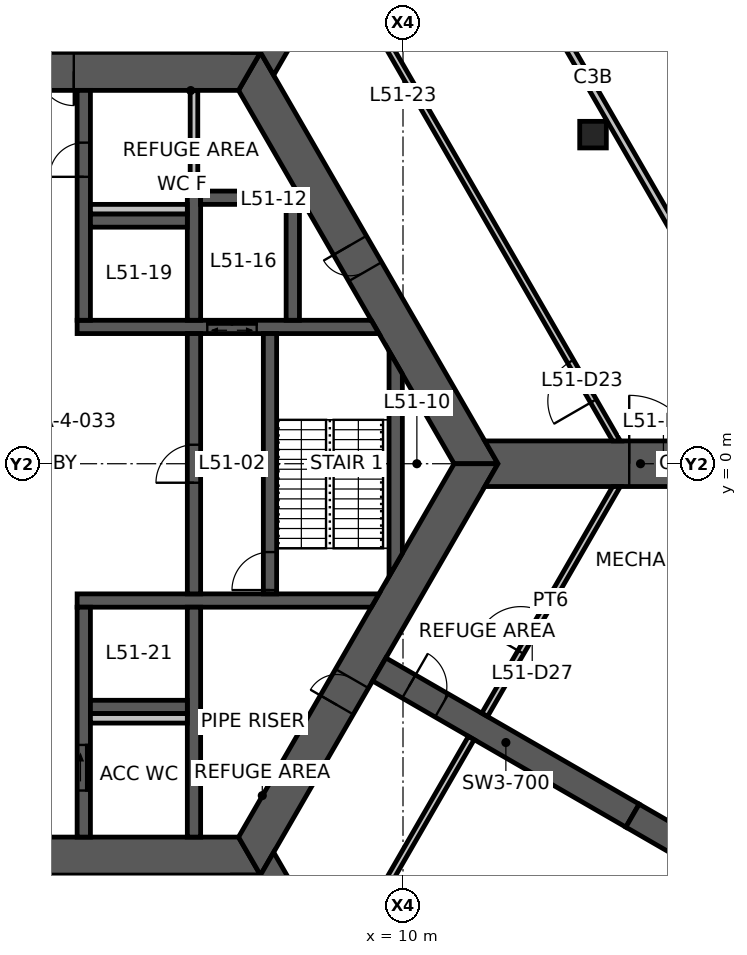
"""IFC4 building model, lengths in metres.
Left out: names, types, materials, properties, quantities, classifications, styles, units other than length and angle.
Written with IfcOpenShell. Run it as: python <this file> out.ifc"""

import sys

from ifc_helpers import new_model, si_unit, direction, frame, frame_2d, origin, origin_2d, place, context, subcontext, project, spatial, polyline, rectangle, hollow_rectangle, outline, extrude, element, fill, save


model = new_model("IFC4")
c1 = context("Model", 3, precision=1e-05, world=origin(), true_north=direction((0.0, 1.0)))
c2 = subcontext(c1, "Body", "Model", "MODEL_VIEW")
j1 = project(units=[si_unit("LENGTHUNIT", "METRE"), si_unit("PLANEANGLEUNIT", "RADIAN")], contexts=[c1])
p1 = place(None, origin())
s1 = spatial("IfcSite", under=j1, at=p1, CompositionType="ELEMENT")
p2 = place(p1, origin())
s2 = spatial("IfcBuilding", under=s1, at=p2, CompositionType="ELEMENT")
p3 = place(p2, frame((0.0, 0.0, 203.3)))
s3 = spatial("IfcBuildingStorey", under=s2, at=p3, CompositionType="ELEMENT", Elevation=203.3)
p4 = place(p3, frame((15.0, 8.66, 0.0), z_axis=(0.0, 0.0, 1.0), x_axis=(1.0, 0.0, 0.0)))
e1 = element("IfcColumn", 1, at=p4, inside=s3, PredefinedType="COLUMN", context=c2, shape_type="SweptSolid", body=[
    extrude(hollow_rectangle(XDim=0.7, YDim=0.7, WallThickness=0.036, at=origin_2d()), origin(), (0.0, 0.0, 1.0), 5.0),
])
p5 = place(p3, frame((11.922, 0.0, 0.0), z_axis=(0.0, 0.0, 1.0), x_axis=(-0.500004296715, 0.866022923061, 0.0)))
e2 = element("IfcWall", 2, at=p5, inside=s3, PredefinedType="SHEAR", context=c2, shape_type="SweptSolid", body=[
    extrude(outline(polyline([(-0.289, -0.5), (5.835, -0.5), (6.635, -0.5), (12.211, -0.5), (11.634, 0.5), (6.635, 0.5), (5.835, 0.5), (0.289, 0.5), (-0.289, -0.5)])), origin(), (0.0, 0.0, 1.0), 5.0),
])
p6 = place(p5, frame((5.835, 0.0, 0.0)))
e3 = element("IfcOpeningElement", 3, at=p6, cuts=e2, PredefinedType="OPENING", context=c2, shape_type="SweptSolid", body=[
    extrude(rectangle(XDim=0.8, YDim=2.1, at=frame_2d((0.4, 1.05))), frame((0.0, 0.51, 0.0), z_axis=(0.0, -1.0, 0.0), x_axis=(1.0, 0.0, 0.0)), (0.0, 0.0, 1.0), 1.02),
])
p7 = place(p3, frame((5.961, 10.325, 0.0), z_axis=(0.0, 0.0, 1.0), x_axis=(-1.0, 0.0, 0.0)))
e4 = element("IfcWall", 4, at=p7, inside=s3, PredefinedType="SHEAR", context=c2, shape_type="SweptSolid", body=[
    extrude(outline(polyline([(-0.289, -0.5), (4.624, -0.5), (5.523, -0.5), (6.399, -0.5), (7.299, -0.5), (12.211, -0.5), (11.634, 0.5), (7.299, 0.5), (6.399, 0.5), (5.523, 0.5), (4.624, 0.5), (0.289, 0.5), (-0.289, -0.5)])), origin(), (0.0, 0.0, 1.0), 5.0),
])
p8 = place(p7, frame((6.399, 0.0, 0.0)))
e5 = element("IfcOpeningElement", 5, at=p8, cuts=e4, PredefinedType="OPENING", context=c2, shape_type="SweptSolid", body=[
    extrude(rectangle(XDim=0.9, YDim=2.1, at=frame_2d((0.45, 1.05))), frame((0.0, 0.51, 0.0), z_axis=(0.0, -1.0, 0.0), x_axis=(1.0, 0.0, 0.0)), (0.0, 0.0, 1.0), 1.02),
])
p9 = place(p7, frame((4.624, 0.0, 0.0)))
e6 = element("IfcOpeningElement", 6, at=p9, cuts=e4, PredefinedType="OPENING", context=c2, shape_type="SweptSolid", body=[
    extrude(rectangle(XDim=0.9, YDim=2.1, at=frame_2d((0.45, 1.05))), frame((0.0, 0.51, 0.0), z_axis=(0.0, -1.0, 0.0), x_axis=(1.0, 0.0, 0.0)), (0.0, 0.0, 1.0), 1.02),
])
p10 = place(p3, frame((-5.961, -10.325, 0.0), z_axis=(0.0, 0.0, 1.0), x_axis=(1.0, 0.0, 0.0)))
e7 = element("IfcWall", 7, at=p10, inside=s3, PredefinedType="SHEAR", context=c2, shape_type="SweptSolid", body=[
    extrude(outline(polyline([(-0.289, -0.5), (5.461, -0.5), (6.461, -0.5), (12.211, -0.5), (11.634, 0.5), (6.461, 0.5), (5.461, 0.5), (0.289, 0.5), (-0.289, -0.5)])), origin(), (0.0, 0.0, 1.0), 5.0),
])
p11 = place(p10, frame((5.461, 0.0, 0.0)))
e8 = element("IfcOpeningElement", 8, at=p11, cuts=e7, PredefinedType="OPENING", context=c2, shape_type="SweptSolid", body=[
    extrude(rectangle(XDim=1.0, YDim=2.1, at=frame_2d((0.5, 1.05))), frame((0.0, 0.51, 0.0), z_axis=(0.0, -1.0, 0.0), x_axis=(1.0, 0.0, 0.0)), (0.0, 0.0, 1.0), 1.02),
])
p12 = place(p3, frame((5.961, -10.325, 0.0), z_axis=(0.0, 0.0, 1.0), x_axis=(0.500004296715, 0.866022923061, 0.0)))
e9 = element("IfcWall", 9, at=p12, inside=s3, PredefinedType="SHEAR", context=c2, shape_type="SweptSolid", body=[
    extrude(outline(polyline([(-0.289, -0.5), (4.594, -0.5), (5.394, -0.5), (12.211, -0.5), (11.634, 0.5), (5.394, 0.5), (4.594, 0.5), (0.289, 0.5), (-0.289, -0.5)])), origin(), (0.0, 0.0, 1.0), 5.0),
])
p13 = place(p12, frame((4.594, 0.0, 0.0)))
e10 = element("IfcOpeningElement", 10, at=p13, cuts=e9, PredefinedType="OPENING", context=c2, shape_type="SweptSolid", body=[
    extrude(rectangle(XDim=0.8, YDim=2.1, at=frame_2d((0.4, 1.05))), frame((0.0, 0.51, 0.0), z_axis=(0.0, -1.0, 0.0), x_axis=(1.0, 0.0, 0.0)), (0.0, 0.0, 1.0), 1.02),
])
p14 = place(p3, frame((9.375, -5.413, 0.0), z_axis=(0.0, 0.0, 1.0), x_axis=(0.866032377459, -0.499987921047, 0.0)))
e11 = element("IfcWall", 11, at=p14, inside=s3, PredefinedType="SHEAR", context=c2, shape_type="SweptSolid", body=[
    extrude(rectangle(XDim=7.696, YDim=0.7, at=frame_2d((3.848, 0.0))), origin(), (0.0, 0.0, 1.0), 5.0),
])
p15 = place(p14, frame((0.9, 0.0, 0.0)))
e12 = element("IfcOpeningElement", 12, at=p15, cuts=e11, PredefinedType="OPENING", context=c2, shape_type="SweptSolid", body=[
    extrude(rectangle(XDim=1.0, YDim=2.1, at=frame_2d((0.5, 1.05))), frame((0.0, 0.36, 0.0), z_axis=(0.0, -1.0, 0.0), x_axis=(1.0, 0.0, 0.0)), (0.0, 0.0, 1.0), 0.72),
])
p16 = place(p3, frame((16.039, -9.26, 0.0), z_axis=(0.0, 0.0, 1.0), x_axis=(0.866024837091, -0.50000098154, 0.0)))
e13 = element("IfcWall", 13, at=p16, inside=s3, PredefinedType="SHEAR", context=c2, shape_type="SweptSolid", body=[
    extrude(rectangle(XDim=13.0, YDim=0.7, at=frame_2d((6.5, 0.0))), origin(), (0.0, 0.0, 1.0), 5.0),
])
p17 = place(p3, frame((12.5, 0.0, -1.15), z_axis=(0.0, 0.0, 1.0), x_axis=(1.0, 0.0, 0.0)))
e14 = element("IfcWall", 14, at=p17, inside=s3, PredefinedType="SHEAR", context=c2, shape_type="SweptSolid", body=[
    extrude(outline(polyline([(-0.346, -0.6), (3.453, -0.6), (5.253, -0.6), (7.5, -0.6), (7.5, 0.6), (5.253, 0.6), (3.453, 0.6), (-0.346, 0.6), (0.0, 0.0), (-0.346, -0.6)])), origin(), (0.0, 0.0, 1.0), 6.15),
])
p18 = place(p17, frame((3.453, 0.0, 1.15)))
e15 = element("IfcOpeningElement", 15, at=p18, cuts=e14, PredefinedType="OPENING", context=c2, shape_type="SweptSolid", body=[
    extrude(rectangle(XDim=1.8, YDim=2.4, at=frame_2d((0.9, 1.2))), frame((0.0, 0.61, 0.0), z_axis=(0.0, -1.0, 0.0), x_axis=(1.0, 0.0, 0.0)), (0.0, 0.0, 1.0), 1.22),
])
for number, where, z_axis, x_axis in (
    (16, (6.25, 10.825, -1.15), (0.0, 0.0, 1.0), (0.5, 0.866, 0.0)),
    (17, (6.25, -10.825, -1.15), (0.0, 0.0, 1.0), (0.5, -0.866, 0.0)),
):
    element("IfcWall", number, at=place(p3, frame(where, z_axis=z_axis, x_axis=x_axis)), inside=s3, PredefinedType="SHEAR", context=c2, shape_type="SweptSolid", body=[
        extrude(outline(polyline([(-0.346, -0.6), (7.5, -0.6), (7.5, 0.6), (-0.346, 0.6), (0.0, 0.0), (-0.346, -0.6)])), origin(), (0.0, 0.0, 1.0), 6.15),
    ])
p19 = place(p3, frame((20.389, 0.526, 0.0), z_axis=(0.0, 0.0, 1.0), x_axis=(-0.499993861681, 0.866028947716, 0.0)))
e18 = element("IfcWall", 18, at=p19, inside=s3, PredefinedType="ELEMENTEDWALL", context=c2, shape_type="SweptSolid", body=[
    extrude(rectangle(XDim=19.986, YDim=0.2, at=frame_2d((9.993, 0.0))), origin(), (0.0, 0.0, 1.0), 5.0),
])
p20 = place(p3, frame((1.425, 3.6, 0.0), z_axis=(0.0, 0.0, 1.0), x_axis=(1.0, 0.0, 0.0)))
e19 = element("IfcWall", 19, at=p20, inside=s3, PredefinedType="SHEAR", context=c2, shape_type="SweptSolid", body=[
    extrude(outline(polyline([(0.0, -0.175), (3.425, -0.175), (4.725, -0.175), (7.942, -0.175), (7.74, 0.175), (4.725, 0.175), (3.425, 0.175), (0.0, 0.175), (0.0, -0.175)])), origin(), (0.0, 0.0, 1.0), 5.0),
])
p21 = place(p20, frame((3.425, 0.0, 0.0)))
e20 = element("IfcOpeningElement", 20, at=p21, cuts=e19, PredefinedType="OPENING", context=c2, shape_type="SweptSolid", body=[
    extrude(rectangle(XDim=1.3, YDim=2.1, at=frame_2d((0.65, 1.05))), frame((0.0, 0.185, 0.0), z_axis=(0.0, -1.0, 0.0), x_axis=(1.0, 0.0, 0.0)), (0.0, 0.0, 1.0), 0.37),
])
p22 = place(p3, frame((1.425, -3.6, 0.0), z_axis=(0.0, 0.0, 1.0), x_axis=(1.0, 0.0, 0.0)))
e21 = element("IfcWall", 21, at=p22, inside=s3, PredefinedType="SHEAR", context=c2, shape_type="SweptSolid", body=[
    extrude(outline(polyline([(0.0, -0.175), (7.74, -0.175), (7.942, 0.175), (0.0, 0.175), (0.0, -0.175)])), origin(), (0.0, 0.0, 1.0), 5.0),
])
p23 = place(p3, frame((1.6, 3.775, 0.0), z_axis=(0.0, 0.0, 1.0), x_axis=(0.0, 1.0, 0.0)))
e22 = element("IfcWall", 22, at=p23, inside=s3, PredefinedType="SHEAR", context=c2, shape_type="SweptSolid", body=[
    extrude(rectangle(XDim=6.05, YDim=0.35, at=frame_2d((3.025, 0.0))), origin(), (0.0, 0.0, 1.0), 5.0),
])
p24 = place(p23, frame((3.775, 0.0, 0.0)))
e23 = element("IfcOpeningElement", 23, at=p24, cuts=e22, PredefinedType="OPENING", context=c2, shape_type="SweptSolid", body=[
    extrude(rectangle(XDim=0.9, YDim=2.1, at=frame_2d((0.45, 1.05))), frame((0.0, 0.185, 0.0), z_axis=(0.0, -1.0, 0.0), x_axis=(1.0, 0.0, 0.0)), (0.0, 0.0, 1.0), 0.37),
])
p25 = place(p3, frame((1.6, -3.775, 0.0), z_axis=(0.0, 0.0, 1.0), x_axis=(0.0, -1.0, 0.0)))
e24 = element("IfcWall", 24, at=p25, inside=s3, PredefinedType="SHEAR", context=c2, shape_type="SweptSolid", body=[
    extrude(rectangle(XDim=6.05, YDim=0.35, at=frame_2d((3.025, 0.0))), origin(), (0.0, 0.0, 1.0), 5.0),
])
p26 = place(p25, frame((3.625, 0.0, 0.0)))
e25 = element("IfcOpeningElement", 25, at=p26, cuts=e24, PredefinedType="OPENING", context=c2, shape_type="SweptSolid", body=[
    extrude(rectangle(XDim=1.2, YDim=2.1, at=frame_2d((0.6, 1.05))), frame((0.0, 0.185, 0.0), z_axis=(0.0, -1.0, 0.0), x_axis=(1.0, 0.0, 0.0)), (0.0, 0.0, 1.0), 0.37),
])
p27 = place(p3, frame((4.5, -3.425, 0.0), z_axis=(0.0, 0.0, 1.0), x_axis=(0.0, 1.0, 0.0)))
e26 = element("IfcWall", 26, at=p27, inside=s3, PredefinedType="SHEAR", context=c2, shape_type="SweptSolid", body=[
    extrude(rectangle(XDim=6.85, YDim=0.35, at=frame_2d((3.425, 0.0))), origin(), (0.0, 0.0, 1.0), 5.0),
])
p28 = place(p27, frame((2.925, 0.0, 0.0)))
e27 = element("IfcOpeningElement", 27, at=p28, cuts=e26, PredefinedType="OPENING", context=c2, shape_type="SweptSolid", body=[
    extrude(rectangle(XDim=1.0, YDim=2.1, at=frame_2d((0.5, 1.05))), frame((0.0, 0.185, 0.0), z_axis=(0.0, -1.0, 0.0), x_axis=(1.0, 0.0, 0.0)), (0.0, 0.0, 1.0), 0.37),
])
p29 = place(p3, frame((6.5, -3.425, 0.0), z_axis=(0.0, 0.0, 1.0), x_axis=(0.0, 1.0, 0.0)))
e28 = element("IfcWall", 28, at=p29, inside=s3, PredefinedType="SHEAR", context=c2, shape_type="SweptSolid", body=[
    extrude(rectangle(XDim=6.85, YDim=0.35, at=frame_2d((3.425, 0.0))), origin(), (0.0, 0.0, 1.0), 5.0),
])
p30 = place(p29, frame((0.1, 0.0, 0.0)))
e29 = element("IfcOpeningElement", 29, at=p30, cuts=e28, PredefinedType="OPENING", context=c2, shape_type="SweptSolid", body=[
    extrude(rectangle(XDim=1.0, YDim=2.1, at=frame_2d((0.5, 1.05))), frame((0.0, 0.185, 0.0), z_axis=(0.0, -1.0, 0.0), x_axis=(1.0, 0.0, 0.0)), (0.0, 0.0, 1.0), 0.37),
])
p31 = place(p3, frame((4.5, 3.775, 0.0), z_axis=(0.0, 0.0, 1.0), x_axis=(0.0, 1.0, 0.0)))
e30 = element("IfcWall", 30, at=p31, inside=s3, PredefinedType="SHEAR", context=c2, shape_type="SweptSolid", body=[
    extrude(rectangle(XDim=3.4, YDim=0.35, at=frame_2d((1.7, 0.0))), origin(), (0.0, 0.0, 1.0), 5.0),
])
p32 = place(p3, frame((4.5, -3.775, 0.0), z_axis=(0.0, 0.0, 1.0), x_axis=(0.0, -1.0, 0.0)))
e31 = element("IfcWall", 31, at=p32, inside=s3, PredefinedType="SHEAR", context=c2, shape_type="SweptSolid", body=[
    extrude(rectangle(XDim=6.05, YDim=0.35, at=frame_2d((3.025, 0.0))), origin(), (0.0, 0.0, 1.0), 5.0),
])
for number, where, z_axis, x_axis in (
    (32, (1.775, 6.4, 0.0), (0.0, 0.0, 1.0), (1.0, 0.0, 0.0)),
    (33, (1.775, -6.4, 0.0), (0.0, 0.0, 1.0), (1.0, 0.0, 0.0)),
):
    element("IfcWall", number, at=place(p3, frame(where, z_axis=z_axis, x_axis=x_axis)), inside=s3, PredefinedType="SHEAR", context=c2, shape_type="SweptSolid", body=[
        extrude(rectangle(XDim=2.55, YDim=0.35, at=frame_2d((1.275, 0.0))), origin(), (0.0, 0.0, 1.0), 5.0),
    ])
p33 = place(p3, frame((4.675, 7.0, 0.0), z_axis=(0.0, 0.0, 1.0), x_axis=(1.0, 0.0, 0.0)))
e34 = element("IfcWall", 34, at=p33, inside=s3, PredefinedType="SHEAR", context=c2, shape_type="SweptSolid", body=[
    extrude(rectangle(XDim=2.25, YDim=0.35, at=frame_2d((1.125, 0.0))), origin(), (0.0, 0.0, 1.0), 5.0),
])
p34 = place(p3, frame((7.1, 3.775, 0.0), z_axis=(0.0, 0.0, 1.0), x_axis=(0.0, 1.0, 0.0)))
e35 = element("IfcWall", 35, at=p34, inside=s3, PredefinedType="SHEAR", context=c2, shape_type="SweptSolid", body=[
    extrude(outline(polyline([(0.0, -0.175), (3.274, -0.175), (3.4, 0.0), (3.4, 0.175), (0.0, 0.175), (0.0, -0.175)])), origin(), (0.0, 0.0, 1.0), 5.0),
])
p35 = place(p3, frame((9.808, -2.662, 0.0), z_axis=(0.0, 0.0, 1.0), x_axis=(0.0, 1.0, 0.0)))
e36 = element("IfcWall", 36, at=p35, inside=s3, PredefinedType="SHEAR", context=c2, shape_type="SweptSolid", body=[
    extrude(outline(polyline([(0.303, -0.175), (5.021, -0.175), (5.628, 0.175), (-0.303, 0.175), (0.303, -0.175)])), origin(), (0.0, 0.0, 1.0), 5.0),
])
p36 = place(p3, frame((4.5, 7.175, 0.0), z_axis=(0.0, 0.0, 1.0), x_axis=(0.0, 1.0, 0.0)))
e37 = element("IfcWall", 37, at=p36, inside=s3, PredefinedType="STANDARD", context=c2, shape_type="SweptSolid", body=[
    extrude(rectangle(XDim=2.65, YDim=0.2, at=frame_2d((1.325, 0.0))), origin(), (0.0, 0.0, 1.0), 5.0),
])
for number, where, z_axis, x_axis in (
    (38, (1.775, 6.7, 0.0), (0.0, 0.0, 1.0), (1.0, 0.0, 0.0)),
    (39, (1.775, -6.7, 0.0), (0.0, 0.0, 1.0), (1.0, 0.0, 0.0)),
):
    element("IfcWall", number, at=place(p3, frame(where, z_axis=z_axis, x_axis=x_axis)), inside=s3, PredefinedType="PLUMBINGWALL", context=c2, shape_type="SweptSolid", body=[
        extrude(rectangle(XDim=2.55, YDim=0.25, at=frame_2d((1.275, 0.0))), origin(), (0.0, 0.0, 1.0), 5.0),
    ])
p37 = place(p3, frame((15.617, 0.6, 0.0), z_axis=(0.0, 0.0, 1.0), x_axis=(-0.499988229334, 0.866032199475, 0.0)))
e40 = element("IfcWall", 40, at=p37, inside=s3, PredefinedType="PARTITIONING", context=c2, shape_type="SweptSolid", body=[
    extrude(outline(polyline([(-0.051, -0.087), (1.213, -0.087), (2.413, -0.087), (14.628, -0.087), (14.527, 0.087), (2.413, 0.087), (1.213, 0.087), (0.051, 0.087), (-0.051, -0.087)])), origin(), (0.0, 0.0, 1.0), 4.8),
])
p38 = place(p37, frame((1.213, 0.0, 0.0)))
e41 = element("IfcOpeningElement", 41, at=p38, cuts=e40, PredefinedType="OPENING", context=c2, shape_type="SweptSolid", body=[
    extrude(rectangle(XDim=1.2, YDim=2.1, at=frame_2d((0.6, 1.05))), frame((0.0, 0.098, 0.0), z_axis=(0.0, -1.0, 0.0), x_axis=(1.0, 0.0, 0.0)), (0.0, 0.0, 1.0), 0.195),
])
p39 = place(p3, frame((12.15, -6.605, 0.0), z_axis=(0.0, 0.0, 1.0), x_axis=(0.499986605379, 0.866033137035, 0.0)))
e42 = element("IfcWall", 42, at=p39, inside=s3, PredefinedType="PARTITIONING", context=c2, shape_type="SweptSolid", body=[
    extrude(outline(polyline([(0.0, -0.087), (1.9, -0.087), (3.1, -0.087), (6.984, -0.087), (6.883, 0.087), (3.1, 0.087), (1.9, 0.087), (0.0, 0.087), (0.0, -0.087)])), origin(), (0.0, 0.0, 1.0), 4.8),
])
p40 = place(p39, frame((1.9, 0.0, 0.0)))
e43 = element("IfcOpeningElement", 43, at=p40, cuts=e42, PredefinedType="OPENING", context=c2, shape_type="SweptSolid", body=[
    extrude(rectangle(XDim=1.2, YDim=2.1, at=frame_2d((0.6, 1.05))), frame((0.0, 0.098, 0.0), z_axis=(0.0, -1.0, 0.0), x_axis=(1.0, 0.0, 0.0)), (0.0, 0.0, 1.0), 0.195),
])
p41 = place(p3, frame((8.328, -13.225, 0.0), z_axis=(0.0, 0.0, 1.0), x_axis=(0.49999776677, 0.866026693137, 0.0)))
e44 = element("IfcWall", 44, at=p41, inside=s3, PredefinedType="PARTITIONING", context=c2, shape_type="SweptSolid", body=[
    extrude(outline(polyline([(-0.051, -0.087), (6.934, -0.087), (6.934, 0.087), (0.051, 0.087), (-0.051, -0.087)])), origin(), (0.0, 0.0, 1.0), 4.8),
])
p42 = place(p9, origin())
e45 = element("IfcDoor", 45, at=p42, inside=s3, OperationType="SINGLE_SWING_LEFT", PredefinedType="DOOR", context=c2, shape_type="SweptSolid", body=[
    extrude(rectangle(XDim=0.9, YDim=2.1, at=frame_2d((0.45, 1.05))), frame((0.0, 0.025, 0.0), z_axis=(0.0, -1.0, 0.0), x_axis=(1.0, 0.0, 0.0)), (0.0, 0.0, 1.0), 0.05),
])
fill(e6, e45)
p43 = place(p6, origin())
e46 = element("IfcDoor", 46, at=p43, inside=s3, OperationType="SINGLE_SWING_RIGHT", PredefinedType="DOOR", context=c2, shape_type="SweptSolid", body=[
    extrude(rectangle(XDim=0.8, YDim=2.1, at=frame_2d((0.4, 1.05))), frame((0.0, 0.025, 0.0), z_axis=(0.0, -1.0, 0.0), x_axis=(1.0, 0.0, 0.0)), (0.0, 0.0, 1.0), 0.05),
])
fill(e3, e46)
p44 = place(p13, origin())
e47 = element("IfcDoor", 47, at=p44, inside=s3, OperationType="SINGLE_SWING_LEFT", PredefinedType="DOOR", context=c2, shape_type="SweptSolid", body=[
    extrude(rectangle(XDim=0.8, YDim=2.1, at=frame_2d((0.4, 1.05))), frame((0.0, 0.025, 0.0), z_axis=(0.0, -1.0, 0.0), x_axis=(1.0, 0.0, 0.0)), (0.0, 0.0, 1.0), 0.05),
])
fill(e10, e47)
p45 = place(p28, origin())
e48 = element("IfcDoor", 48, at=p45, inside=s3, OperationType="SINGLE_SWING_LEFT", PredefinedType="DOOR", context=c2, shape_type="SweptSolid", body=[
    extrude(rectangle(XDim=1.0, YDim=2.1, at=frame_2d((0.5, 1.05))), frame((0.0, 0.025, 0.0), z_axis=(0.0, -1.0, 0.0), x_axis=(1.0, 0.0, 0.0)), (0.0, 0.0, 1.0), 0.05),
])
fill(e27, e48)
p46 = place(p30, origin())
e49 = element("IfcDoor", 49, at=p46, inside=s3, OperationType="SINGLE_SWING_LEFT", PredefinedType="DOOR", context=c2, shape_type="SweptSolid", body=[
    extrude(rectangle(XDim=1.0, YDim=2.1, at=frame_2d((0.5, 1.05))), frame((0.0, 0.025, 0.0), z_axis=(0.0, -1.0, 0.0), x_axis=(1.0, 0.0, 0.0)), (0.0, 0.0, 1.0), 0.05),
])
fill(e29, e49)
p47 = place(p24, origin())
e50 = element("IfcDoor", 50, at=p47, inside=s3, OperationType="SINGLE_SWING_LEFT", PredefinedType="DOOR", context=c2, shape_type="SweptSolid", body=[
    extrude(rectangle(XDim=0.9, YDim=2.1, at=frame_2d((0.45, 1.05))), frame((0.0, 0.025, 0.0), z_axis=(0.0, -1.0, 0.0), x_axis=(1.0, 0.0, 0.0)), (0.0, 0.0, 1.0), 0.05),
])
fill(e23, e50)
p48 = place(p26, origin())
e51 = element("IfcDoor", 51, at=p48, inside=s3, OperationType="SLIDING_TO_LEFT", PredefinedType="DOOR", context=c2, shape_type="SweptSolid", body=[
    extrude(rectangle(XDim=1.2, YDim=2.1, at=frame_2d((0.6, 1.05))), frame((0.0, 0.025, 0.0), z_axis=(0.0, -1.0, 0.0), x_axis=(1.0, 0.0, 0.0)), (0.0, 0.0, 1.0), 0.05),
])
fill(e25, e51)
p49 = place(p15, origin())
e52 = element("IfcDoor", 52, at=p49, inside=s3, OperationType="SINGLE_SWING_LEFT", PredefinedType="DOOR", context=c2, shape_type="SweptSolid", body=[
    extrude(rectangle(XDim=1.0, YDim=2.1, at=frame_2d((0.5, 1.05))), frame((0.0, 0.025, 0.0), z_axis=(0.0, -1.0, 0.0), x_axis=(1.0, 0.0, 0.0)), (0.0, 0.0, 1.0), 0.05),
])
fill(e12, e52)
p50 = place(p18, origin())
e53 = element("IfcDoor", 53, at=p50, inside=s3, OperationType="DOUBLE_DOOR_SINGLE_SWING", PredefinedType="DOOR", context=c2, shape_type="SweptSolid", body=[
    extrude(rectangle(XDim=1.8, YDim=2.4, at=frame_2d((0.9, 1.2))), frame((0.0, 0.025, 0.0), z_axis=(0.0, -1.0, 0.0), x_axis=(1.0, 0.0, 0.0)), (0.0, 0.0, 1.0), 0.05),
])
fill(e15, e53)
p51 = place(p38, origin())
e54 = element("IfcDoor", 54, at=p51, inside=s3, OperationType="DOUBLE_DOOR_SINGLE_SWING", PredefinedType="DOOR", context=c2, shape_type="SweptSolid", body=[
    extrude(rectangle(XDim=1.2, YDim=2.1, at=frame_2d((0.6, 1.05))), frame((0.0, 0.025, 0.0), z_axis=(0.0, -1.0, 0.0), x_axis=(1.0, 0.0, 0.0)), (0.0, 0.0, 1.0), 0.05),
])
fill(e41, e54)
p52 = place(p40, origin())
e55 = element("IfcDoor", 55, at=p52, inside=s3, OperationType="DOUBLE_DOOR_SINGLE_SWING", PredefinedType="DOOR", context=c2, shape_type="SweptSolid", body=[
    extrude(rectangle(XDim=1.2, YDim=2.1, at=frame_2d((0.6, 1.05))), frame((0.0, 0.025, 0.0), z_axis=(0.0, -1.0, 0.0), x_axis=(1.0, 0.0, 0.0)), (0.0, 0.0, 1.0), 0.05),
])
fill(e43, e55)
p53 = place(p21, origin())
e56 = element("IfcDoor", 56, at=p53, inside=s3, OperationType="DOUBLE_DOOR_SLIDING", PredefinedType="DOOR", context=c2, shape_type="SweptSolid", body=[
    extrude(rectangle(XDim=1.3, YDim=2.1, at=frame_2d((0.65, 1.05))), frame((0.0, 0.025, 0.0), z_axis=(0.0, -1.0, 0.0), x_axis=(1.0, 0.0, 0.0)), (0.0, 0.0, 1.0), 0.05),
])
fill(e20, e56)
save(model, sys.argv[1])
